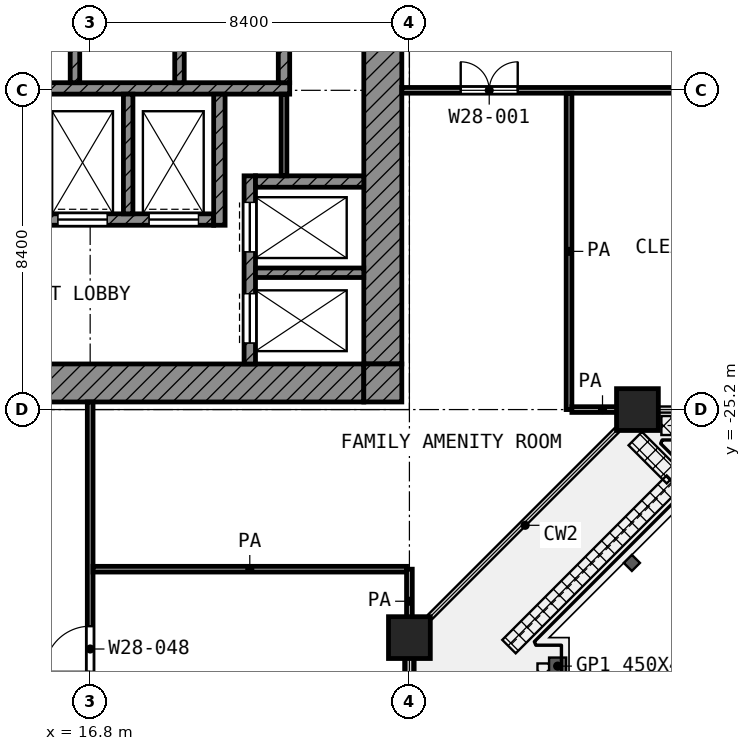
"""IFC4 building model, lengths in metres.
Left out: names, types, materials, properties, quantities, classifications, styles, units other than length and angle.
Written with IfcOpenShell. Run it as: python <this file> out.ifc"""

import sys

from ifc_helpers import new_model, si_unit, direction, frame, frame_2d, origin, origin_2d, place, context, subcontext, project, spatial, rectangle, extrude, element, fill, save


model = new_model("IFC4")
c1 = context("Model", 3, precision=1e-05, world=origin(), true_north=direction((0.0, 1.0)))
c2 = subcontext(c1, "Body", "Model", "MODEL_VIEW")
j1 = project(units=[si_unit("LENGTHUNIT", "METRE"), si_unit("PLANEANGLEUNIT", "RADIAN")], contexts=[c1])
p1 = place(None, origin())
s1 = spatial("IfcSite", under=j1, at=p1, CompositionType="ELEMENT")
p2 = place(p1, origin())
s2 = spatial("IfcBuilding", under=s1, at=p2, CompositionType="ELEMENT")
p3 = place(p2, frame((0.0, 0.0, 145.0)))
s3 = spatial("IfcBuildingStorey", under=s2, at=p3, CompositionType="ELEMENT", Elevation=145.0)
for number, where, z_axis, x_axis in (
    (1, (31.2, -25.2, 0.0), (0.0, 0.0, 1.0), (1.0, 0.0, 0.0)),
    (2, (25.2, -31.2, 0.0), (0.0, 0.0, 1.0), (1.0, 0.0, 0.0)),
):
    element("IfcColumn", number, at=place(p3, frame(where, z_axis=z_axis, x_axis=x_axis)), inside=s3, PredefinedType="COLUMN", context=c2, shape_type="SweptSolid", body=[
        extrude(rectangle(XDim=1.1, YDim=1.1, at=origin_2d()), origin(), (0.0, 0.0, 1.0), 4.2),
    ])
p4 = place(p3, frame((25.2, -34.992, 0.0), z_axis=(0.0, 0.0, 1.0), x_axis=(0.0, 1.0, 0.0)))
e3 = element("IfcWall", 3, at=p4, inside=s3, PredefinedType="SOLIDWALL", context=c2, shape_type="SweptSolid", body=[
    extrude(rectangle(XDim=3.242, YDim=0.25, at=frame_2d((1.621, 0.0))), origin(), (0.0, 0.0, 1.0), 3.48),
])
p5 = place(p4, frame((1.621, 0.0, 0.0)))
e4 = element("IfcOpeningElement", 4, at=p5, cuts=e3, PredefinedType="OPENING", context=c2, shape_type="SweptSolid", body=[
    extrude(rectangle(XDim=1.0, YDim=2.1, at=frame_2d((0.5, 1.05))), frame((0.0, 0.135, 0.0), z_axis=(0.0, -1.0, 0.0), x_axis=(1.0, 0.0, 0.0)), (0.0, 0.0, 1.0), 0.27),
])
p6 = place(p3, frame((24.5, -24.0, 0.0), z_axis=(0.0, 0.0, 1.0), x_axis=(0.0, 1.0, 0.0)))
e5 = element("IfcWall", 5, at=p6, inside=s3, PredefinedType="SHEAR", context=c2, shape_type="SweptSolid", body=[
    extrude(rectangle(XDim=18.6, YDim=1.0, at=frame_2d((9.3, 0.0))), origin(), (0.0, 0.0, 1.0), 3.6),
])
p7 = place(p6, frame((10.5, 0.0, 0.0)))
e6 = element("IfcOpeningElement", 6, at=p7, cuts=e5, PredefinedType="OPENING", context=c2, shape_type="SweptSolid", body=[
    extrude(rectangle(XDim=1.8, YDim=2.1, at=frame_2d((0.9, 1.05))), frame((0.0, 0.51, 0.0), z_axis=(0.0, -1.0, 0.0), x_axis=(1.0, 0.0, 0.0)), (0.0, 0.0, 1.0), 1.02),
])
p8 = place(p3, frame((5.4, -24.5, 0.0), z_axis=(0.0, 0.0, 1.0), x_axis=(1.0, 0.0, 0.0)))
e7 = element("IfcWall", 7, at=p8, inside=s3, PredefinedType="SHEAR", context=c2, shape_type="SweptSolid", body=[
    extrude(rectangle(XDim=18.6, YDim=1.0, at=frame_2d((9.3, 0.0))), origin(), (0.0, 0.0, 1.0), 3.6),
])
p9 = place(p8, frame((6.3, 0.0, 0.0)))
e8 = element("IfcOpeningElement", 8, at=p9, cuts=e7, PredefinedType="OPENING", context=c2, shape_type="SweptSolid", body=[
    extrude(rectangle(XDim=1.8, YDim=2.1, at=frame_2d((0.9, 1.05))), frame((0.0, 0.51, 0.0), z_axis=(0.0, -1.0, 0.0), x_axis=(1.0, 0.0, 0.0)), (0.0, 0.0, 1.0), 1.02),
])
p10 = place(p3, frame((24.5, -25.0, 0.0), z_axis=(0.0, 0.0, 1.0), x_axis=(0.0, 1.0, 0.0)))
e9 = element("IfcWall", 9, at=p10, inside=s3, PredefinedType="SHEAR", context=c2, shape_type="SweptSolid", body=[
    extrude(rectangle(XDim=1.0, YDim=1.0, at=frame_2d((0.5, 0.0))), origin(), (0.0, 0.0, 1.0), 3.6),
])
p11 = place(p3, frame((5.4, -16.75, 0.0), z_axis=(0.0, 0.0, 1.0), x_axis=(1.0, 0.0, 0.0)))
e10 = element("IfcWall", 10, at=p11, inside=s3, PredefinedType="SHEAR", context=c2, shape_type="SweptSolid", body=[
    extrude(rectangle(XDim=16.65, YDim=0.3, at=frame_2d((8.325, 0.0))), origin(), (0.0, 0.0, 1.0), 3.6),
])
p12 = place(p3, frame((5.4, -20.2, 0.0), z_axis=(0.0, 0.0, 1.0), x_axis=(1.0, 0.0, 0.0)))
e11 = element("IfcWall", 11, at=p12, inside=s3, PredefinedType="SHEAR", context=c2, shape_type="SweptSolid", body=[
    extrude(rectangle(XDim=14.65, YDim=0.3, at=frame_2d((7.325, 0.0))), origin(), (0.0, 0.0, 1.0), 3.6),
])
p13 = place(p12, frame((10.55, 0.0, 0.0)))
e12 = element("IfcOpeningElement", 12, at=p13, cuts=e11, PredefinedType="OPENING", context=c2, shape_type="SweptSolid", body=[
    extrude(rectangle(XDim=1.3, YDim=2.1, at=frame_2d((0.65, 1.05))), frame((0.0, 0.16, 0.0), z_axis=(0.0, -1.0, 0.0), x_axis=(1.0, 0.0, 0.0)), (0.0, 0.0, 1.0), 0.32),
])
p14 = place(p12, frame((12.95, 0.0, 0.0)))
e13 = element("IfcOpeningElement", 13, at=p14, cuts=e11, PredefinedType="OPENING", context=c2, shape_type="SweptSolid", body=[
    extrude(rectangle(XDim=1.3, YDim=2.1, at=frame_2d((0.65, 1.05))), frame((0.0, 0.16, 0.0), z_axis=(0.0, -1.0, 0.0), x_axis=(1.0, 0.0, 0.0)), (0.0, 0.0, 1.0), 0.32),
])
p15 = place(p12, frame((0.55, 0.0, 0.0)))
e14 = element("IfcOpeningElement", 14, at=p15, cuts=e11, PredefinedType="OPENING", context=c2, shape_type="SweptSolid", body=[
    extrude(rectangle(XDim=1.3, YDim=2.1, at=frame_2d((0.65, 1.05))), frame((0.0, 0.16, 0.0), z_axis=(0.0, -1.0, 0.0), x_axis=(1.0, 0.0, 0.0)), (0.0, 0.0, 1.0), 0.32),
])
p16 = place(p12, frame((2.95, 0.0, 0.0)))
e15 = element("IfcOpeningElement", 15, at=p16, cuts=e11, PredefinedType="OPENING", context=c2, shape_type="SweptSolid", body=[
    extrude(rectangle(XDim=1.3, YDim=2.1, at=frame_2d((0.65, 1.05))), frame((0.0, 0.16, 0.0), z_axis=(0.0, -1.0, 0.0), x_axis=(1.0, 0.0, 0.0)), (0.0, 0.0, 1.0), 0.32),
])
p17 = place(p12, frame((7.15, 0.0, 0.0)))
e16 = element("IfcOpeningElement", 16, at=p17, cuts=e11, PredefinedType="OPENING", context=c2, shape_type="SweptSolid", body=[
    extrude(rectangle(XDim=0.9, YDim=2.1, at=frame_2d((0.45, 1.05))), frame((0.0, 0.16, 0.0), z_axis=(0.0, -1.0, 0.0), x_axis=(1.0, 0.0, 0.0)), (0.0, 0.0, 1.0), 0.32),
])
p18 = place(p3, frame((20.2, -20.35, 0.0), z_axis=(0.0, 0.0, 1.0), x_axis=(0.0, 1.0, 0.0)))
e17 = element("IfcWall", 17, at=p18, inside=s3, PredefinedType="SHEAR", context=c2, shape_type="SweptSolid", body=[
    extrude(rectangle(XDim=3.45, YDim=0.3, at=frame_2d((1.725, 0.0))), origin(), (0.0, 0.0, 1.0), 3.6),
])
p19 = place(p3, frame((21.9, -16.6, 0.0), z_axis=(0.0, 0.0, 1.0), x_axis=(0.0, 1.0, 0.0)))
e18 = element("IfcWall", 18, at=p19, inside=s3, PredefinedType="SHEAR", context=c2, shape_type="SweptSolid", body=[
    extrude(rectangle(XDim=2.35, YDim=0.3, at=frame_2d((1.175, 0.0))), origin(), (0.0, 0.0, 1.0), 3.6),
])
p20 = place(p3, frame((21.15, -19.2, 0.0), z_axis=(0.0, 0.0, 1.0), x_axis=(1.0, 0.0, 0.0)))
e19 = element("IfcWall", 19, at=p20, inside=s3, PredefinedType="SHEAR", context=c2, shape_type="SweptSolid", body=[
    extrude(rectangle(XDim=2.85, YDim=0.3, at=frame_2d((1.425, 0.0))), origin(), (0.0, 0.0, 1.0), 3.6),
])
p21 = place(p3, frame((21.0, -24.0, 0.0), z_axis=(0.0, 0.0, 1.0), x_axis=(0.0, 1.0, 0.0)))
e20 = element("IfcWall", 20, at=p21, inside=s3, PredefinedType="SHEAR", context=c2, shape_type="SweptSolid", body=[
    extrude(rectangle(XDim=4.95, YDim=0.3, at=frame_2d((2.475, 0.0))), origin(), (0.0, 0.0, 1.0), 3.6),
])
p22 = place(p21, frame((2.95, 0.0, 0.0)))
e21 = element("IfcOpeningElement", 21, at=p22, cuts=e20, PredefinedType="OPENING", context=c2, shape_type="SweptSolid", body=[
    extrude(rectangle(XDim=1.3, YDim=2.1, at=frame_2d((0.65, 1.05))), frame((0.0, 0.16, 0.0), z_axis=(0.0, -1.0, 0.0), x_axis=(1.0, 0.0, 0.0)), (0.0, 0.0, 1.0), 0.32),
])
p23 = place(p21, frame((0.55, 0.0, 0.0)))
e22 = element("IfcOpeningElement", 22, at=p23, cuts=e20, PredefinedType="OPENING", context=c2, shape_type="SweptSolid", body=[
    extrude(rectangle(XDim=1.3, YDim=2.1, at=frame_2d((0.65, 1.05))), frame((0.0, 0.16, 0.0), z_axis=(0.0, -1.0, 0.0), x_axis=(1.0, 0.0, 0.0)), (0.0, 0.0, 1.0), 0.32),
])
p24 = place(p3, frame((21.15, -21.6, 0.0), z_axis=(0.0, 0.0, 1.0), x_axis=(1.0, 0.0, 0.0)))
e23 = element("IfcWall", 23, at=p24, inside=s3, PredefinedType="SHEAR", context=c2, shape_type="SweptSolid", body=[
    extrude(rectangle(XDim=2.85, YDim=0.25, at=frame_2d((1.425, 0.0))), origin(), (0.0, 0.0, 1.0), 3.6),
])
p25 = place(p3, frame((17.8, -20.05, 0.0), z_axis=(0.0, 0.0, 1.0), x_axis=(0.0, 1.0, 0.0)))
e24 = element("IfcWall", 24, at=p25, inside=s3, PredefinedType="SHEAR", context=c2, shape_type="SweptSolid", body=[
    extrude(rectangle(XDim=3.15, YDim=0.25, at=frame_2d((1.575, 0.0))), origin(), (0.0, 0.0, 1.0), 3.6),
])
for number, where, z_axis, x_axis in (
    (25, (16.4, -16.6, 0.0), (0.0, 0.0, 1.0), (0.0, 1.0, 0.0)),
    (26, (19.15, -16.6, 0.0), (0.0, 0.0, 1.0), (0.0, 1.0, 0.0)),
):
    element("IfcWall", number, at=place(p3, frame(where, z_axis=z_axis, x_axis=x_axis)), inside=s3, PredefinedType="SHEAR", context=c2, shape_type="SweptSolid", body=[
        extrude(rectangle(XDim=2.35, YDim=0.25, at=frame_2d((1.175, 0.0))), origin(), (0.0, 0.0, 1.0), 3.6),
    ])
p26 = place(p3, frame((21.9, -19.05, 0.0), z_axis=(0.0, 0.0, 1.0), x_axis=(0.0, 1.0, 0.0)))
e27 = element("IfcWall", 27, at=p26, inside=s3, PredefinedType="PARTITIONING", context=c2, shape_type="SweptSolid", body=[
    extrude(rectangle(XDim=2.15, YDim=0.15, at=frame_2d((1.075, 0.0))), origin(), (0.0, 0.0, 1.0), 3.6),
])
p27 = place(p3, frame((16.875, -29.4, 0.0), z_axis=(0.0, 0.0, 1.0), x_axis=(1.0, 0.0, 0.0)))
e28 = element("IfcWall", 28, at=p27, inside=s3, PredefinedType="PARTITIONING", context=c2, shape_type="SweptSolid", body=[
    extrude(rectangle(XDim=8.25, YDim=0.15, at=frame_2d((4.125, 0.0))), origin(), (0.0, 0.0, 1.0), 3.6),
])
p28 = place(p3, frame((29.475, -25.2, 0.0), z_axis=(0.0, 0.0, 1.0), x_axis=(1.0, 0.0, 0.0)))
e29 = element("IfcWall", 29, at=p28, inside=s3, PredefinedType="PARTITIONING", context=c2, shape_type="SweptSolid", body=[
    extrude(rectangle(XDim=1.612, YDim=0.15, at=frame_2d((0.806, 0.0))), origin(), (0.0, 0.0, 1.0), 3.6),
])
p29 = place(p3, frame((25.0, -16.8, 0.0), z_axis=(0.0, 0.0, 1.0), x_axis=(1.0, 0.0, 0.0)))
e30 = element("IfcWall", 30, at=p29, inside=s3, PredefinedType="PARTITIONING", context=c2, shape_type="SweptSolid", body=[
    extrude(rectangle(XDim=41.625, YDim=0.15, at=frame_2d((20.812, 0.0))), origin(), (0.0, 0.0, 1.0), 3.6),
])
p30 = place(p29, frame((1.55, 0.0, 0.0)))
e31 = element("IfcOpeningElement", 31, at=p30, cuts=e30, PredefinedType="OPENING", context=c2, shape_type="SweptSolid", body=[
    extrude(rectangle(XDim=1.5, YDim=2.1, at=frame_2d((0.75, 1.05))), frame((0.0, 0.085, 0.0), z_axis=(0.0, -1.0, 0.0), x_axis=(1.0, 0.0, 0.0)), (0.0, 0.0, 1.0), 0.17),
])
p31 = place(p29, frame((9.2, 0.0, 0.0)))
e32 = element("IfcOpeningElement", 32, at=p31, cuts=e30, PredefinedType="OPENING", context=c2, shape_type="SweptSolid", body=[
    extrude(rectangle(XDim=1.0, YDim=2.1, at=frame_2d((0.5, 1.05))), frame((0.0, 0.085, 0.0), z_axis=(0.0, -1.0, 0.0), x_axis=(1.0, 0.0, 0.0)), (0.0, 0.0, 1.0), 0.17),
])
p32 = place(p29, frame((14.6, 0.0, 0.0)))
e33 = element("IfcOpeningElement", 33, at=p32, cuts=e30, PredefinedType="OPENING", context=c2, shape_type="SweptSolid", body=[
    extrude(rectangle(XDim=1.2, YDim=2.1, at=frame_2d((0.6, 1.05))), frame((0.0, 0.085, 0.0), z_axis=(0.0, -1.0, 0.0), x_axis=(1.0, 0.0, 0.0)), (0.0, 0.0, 1.0), 0.17),
])
p33 = place(p29, frame((17.7, 0.0, 0.0)))
e34 = element("IfcOpeningElement", 34, at=p33, cuts=e30, PredefinedType="OPENING", context=c2, shape_type="SweptSolid", body=[
    extrude(rectangle(XDim=0.9, YDim=2.1, at=frame_2d((0.45, 1.05))), frame((0.0, 0.085, 0.0), z_axis=(0.0, -1.0, 0.0), x_axis=(1.0, 0.0, 0.0)), (0.0, 0.0, 1.0), 0.17),
])
p34 = place(p29, frame((23.6, 0.0, 0.0)))
e35 = element("IfcOpeningElement", 35, at=p34, cuts=e30, PredefinedType="OPENING", context=c2, shape_type="SweptSolid", body=[
    extrude(rectangle(XDim=1.2, YDim=2.1, at=frame_2d((0.6, 1.05))), frame((0.0, 0.085, 0.0), z_axis=(0.0, -1.0, 0.0), x_axis=(1.0, 0.0, 0.0)), (0.0, 0.0, 1.0), 0.17),
])
p35 = place(p29, frame((26.4, 0.0, 0.0)))
e36 = element("IfcOpeningElement", 36, at=p35, cuts=e30, PredefinedType="OPENING", context=c2, shape_type="SweptSolid", body=[
    extrude(rectangle(XDim=1.2, YDim=2.1, at=frame_2d((0.6, 1.05))), frame((0.0, 0.085, 0.0), z_axis=(0.0, -1.0, 0.0), x_axis=(1.0, 0.0, 0.0)), (0.0, 0.0, 1.0), 0.17),
])
p36 = place(p29, frame((35.0, 0.0, 0.0)))
e37 = element("IfcOpeningElement", 37, at=p36, cuts=e30, PredefinedType="OPENING", context=c2, shape_type="SweptSolid", body=[
    extrude(rectangle(XDim=1.2, YDim=2.1, at=frame_2d((0.6, 1.05))), frame((0.0, 0.085, 0.0), z_axis=(0.0, -1.0, 0.0), x_axis=(1.0, 0.0, 0.0)), (0.0, 0.0, 1.0), 0.17),
])
p37 = place(p29, frame((32.25, 0.0, 0.0)))
e38 = element("IfcOpeningElement", 38, at=p37, cuts=e30, PredefinedType="OPENING", context=c2, shape_type="SweptSolid", body=[
    extrude(rectangle(XDim=0.9, YDim=2.1, at=frame_2d((0.45, 1.05))), frame((0.0, 0.085, 0.0), z_axis=(0.0, -1.0, 0.0), x_axis=(1.0, 0.0, 0.0)), (0.0, 0.0, 1.0), 0.17),
])
p38 = place(p29, frame((39.062, 0.0, 0.0)))
e39 = element("IfcOpeningElement", 39, at=p38, cuts=e30, PredefinedType="OPENING", context=c2, shape_type="SweptSolid", body=[
    extrude(rectangle(XDim=0.9, YDim=2.1, at=frame_2d((0.45, 1.05))), frame((0.0, 0.085, 0.0), z_axis=(0.0, -1.0, 0.0), x_axis=(1.0, 0.0, 0.0)), (0.0, 0.0, 1.0), 0.17),
])
p39 = place(p3, frame((16.8, -58.72, 0.0), z_axis=(0.0, 0.0, 1.0), x_axis=(0.0, 1.0, 0.0)))
e40 = element("IfcWall", 40, at=p39, inside=s3, PredefinedType="PARTITIONING", context=c2, shape_type="SweptSolid", body=[
    extrude(rectangle(XDim=33.72, YDim=0.15, at=frame_2d((16.86, 0.0))), origin(), (0.0, 0.0, 1.0), 2.7),
])
p40 = place(p39, frame((26.62, 0.0, 0.0)))
e41 = element("IfcOpeningElement", 41, at=p40, cuts=e40, PredefinedType="OPENING", context=c2, shape_type="SweptSolid", body=[
    extrude(rectangle(XDim=1.2, YDim=2.1, at=frame_2d((0.6, 1.05))), frame((0.0, 0.085, 0.0), z_axis=(0.0, -1.0, 0.0), x_axis=(1.0, 0.0, 0.0)), (0.0, 0.0, 1.0), 0.17),
])
p41 = place(p39, frame((22.12, 0.0, 0.0)))
e42 = element("IfcOpeningElement", 42, at=p41, cuts=e40, PredefinedType="OPENING", context=c2, shape_type="SweptSolid", body=[
    extrude(rectangle(XDim=1.2, YDim=2.1, at=frame_2d((0.6, 1.05))), frame((0.0, 0.085, 0.0), z_axis=(0.0, -1.0, 0.0), x_axis=(1.0, 0.0, 0.0)), (0.0, 0.0, 1.0), 0.17),
])
p42 = place(p39, frame((17.92, 0.0, 0.0)))
e43 = element("IfcOpeningElement", 43, at=p42, cuts=e40, PredefinedType="OPENING", context=c2, shape_type="SweptSolid", body=[
    extrude(rectangle(XDim=1.2, YDim=2.1, at=frame_2d((0.6, 1.05))), frame((0.0, 0.085, 0.0), z_axis=(0.0, -1.0, 0.0), x_axis=(1.0, 0.0, 0.0)), (0.0, 0.0, 1.0), 0.17),
])
p43 = place(p39, frame((15.17, 0.0, 0.0)))
e44 = element("IfcOpeningElement", 44, at=p43, cuts=e40, PredefinedType="OPENING", context=c2, shape_type="SweptSolid", body=[
    extrude(rectangle(XDim=0.9, YDim=2.1, at=frame_2d((0.45, 1.05))), frame((0.0, 0.085, 0.0), z_axis=(0.0, -1.0, 0.0), x_axis=(1.0, 0.0, 0.0)), (0.0, 0.0, 1.0), 0.17),
])
p44 = place(p39, frame((9.32, 0.0, 0.0)))
e45 = element("IfcOpeningElement", 45, at=p44, cuts=e40, PredefinedType="OPENING", context=c2, shape_type="SweptSolid", body=[
    extrude(rectangle(XDim=1.2, YDim=2.1, at=frame_2d((0.6, 1.05))), frame((0.0, 0.085, 0.0), z_axis=(0.0, -1.0, 0.0), x_axis=(1.0, 0.0, 0.0)), (0.0, 0.0, 1.0), 0.17),
])
p45 = place(p39, frame((6.52, 0.0, 0.0)))
e46 = element("IfcOpeningElement", 46, at=p45, cuts=e40, PredefinedType="OPENING", context=c2, shape_type="SweptSolid", body=[
    extrude(rectangle(XDim=1.2, YDim=2.1, at=frame_2d((0.6, 1.05))), frame((0.0, 0.085, 0.0), z_axis=(0.0, -1.0, 0.0), x_axis=(1.0, 0.0, 0.0)), (0.0, 0.0, 1.0), 0.17),
])
p46 = place(p39, frame((1.37, 0.0, 0.0)))
e47 = element("IfcOpeningElement", 47, at=p46, cuts=e40, PredefinedType="OPENING", context=c2, shape_type="SweptSolid", body=[
    extrude(rectangle(XDim=1.0, YDim=2.1, at=frame_2d((0.5, 1.05))), frame((0.0, 0.085, 0.0), z_axis=(0.0, -1.0, 0.0), x_axis=(1.0, 0.0, 0.0)), (0.0, 0.0, 1.0), 0.17),
])
p47 = place(p3, frame((25.2, -31.087, 0.0), z_axis=(0.0, 0.0, 1.0), x_axis=(0.0, 1.0, 0.0)))
e48 = element("IfcWall", 48, at=p47, inside=s3, PredefinedType="PARTITIONING", context=c2, shape_type="SweptSolid", body=[
    extrude(rectangle(XDim=1.687, YDim=0.15, at=frame_2d((0.844, 0.0))), origin(), (0.0, 0.0, 1.0), 3.6),
])
p48 = place(p3, frame((29.4, -25.2, 0.0), z_axis=(0.0, 0.0, 1.0), x_axis=(0.0, 1.0, 0.0)))
e49 = element("IfcWall", 49, at=p48, inside=s3, PredefinedType="PARTITIONING", context=c2, shape_type="SweptSolid", body=[
    extrude(rectangle(XDim=8.325, YDim=0.15, at=frame_2d((4.163, 0.0))), origin(), (0.0, 0.0, 1.0), 3.6),
])
p49 = place(p22, origin())
e50 = element("IfcDoor", 50, at=p49, inside=s3, OperationType="DOUBLE_DOOR_SLIDING", PredefinedType="DOOR", context=c2, shape_type="SweptSolid", body=[
    extrude(rectangle(XDim=1.3, YDim=2.1, at=frame_2d((0.65, 1.05))), frame((0.0, 0.025, 0.0), z_axis=(0.0, -1.0, 0.0), x_axis=(1.0, 0.0, 0.0)), (0.0, 0.0, 1.0), 0.05),
])
fill(e21, e50)
p50 = place(p23, origin())
e51 = element("IfcDoor", 51, at=p50, inside=s3, OperationType="DOUBLE_DOOR_SLIDING", PredefinedType="DOOR", context=c2, shape_type="SweptSolid", body=[
    extrude(rectangle(XDim=1.3, YDim=2.1, at=frame_2d((0.65, 1.05))), frame((0.0, 0.025, 0.0), z_axis=(0.0, -1.0, 0.0), x_axis=(1.0, 0.0, 0.0)), (0.0, 0.0, 1.0), 0.05),
])
fill(e22, e51)
p51 = place(p13, origin())
e52 = element("IfcDoor", 52, at=p51, inside=s3, OperationType="DOUBLE_DOOR_SLIDING", PredefinedType="DOOR", context=c2, shape_type="SweptSolid", body=[
    extrude(rectangle(XDim=1.3, YDim=2.1, at=frame_2d((0.65, 1.05))), frame((0.0, 0.025, 0.0), z_axis=(0.0, -1.0, 0.0), x_axis=(1.0, 0.0, 0.0)), (0.0, 0.0, 1.0), 0.05),
])
fill(e12, e52)
p52 = place(p14, origin())
e53 = element("IfcDoor", 53, at=p52, inside=s3, OperationType="DOUBLE_DOOR_SLIDING", PredefinedType="DOOR", context=c2, shape_type="SweptSolid", body=[
    extrude(rectangle(XDim=1.3, YDim=2.1, at=frame_2d((0.65, 1.05))), frame((0.0, 0.025, 0.0), z_axis=(0.0, -1.0, 0.0), x_axis=(1.0, 0.0, 0.0)), (0.0, 0.0, 1.0), 0.05),
])
fill(e13, e53)
p53 = place(p30, origin())
e54 = element("IfcDoor", 54, at=p53, inside=s3, OperationType="DOUBLE_DOOR_SINGLE_SWING", PredefinedType="DOOR", context=c2, shape_type="SweptSolid", body=[
    extrude(rectangle(XDim=1.5, YDim=2.1, at=frame_2d((0.75, 1.05))), frame((0.0, 0.025, 0.0), z_axis=(0.0, -1.0, 0.0), x_axis=(1.0, 0.0, 0.0)), (0.0, 0.0, 1.0), 0.05),
])
fill(e31, e54)
p54 = place(p40, origin())
e55 = element("IfcDoor", 55, at=p54, inside=s3, OperationType="SINGLE_SWING_LEFT", PredefinedType="DOOR", context=c2, shape_type="SweptSolid", body=[
    extrude(rectangle(XDim=1.2, YDim=2.1, at=frame_2d((0.6, 1.05))), frame((0.0, 0.025, 0.0), z_axis=(0.0, -1.0, 0.0), x_axis=(1.0, 0.0, 0.0)), (0.0, 0.0, 1.0), 0.05),
])
fill(e41, e55)
save(model, sys.argv[1])
